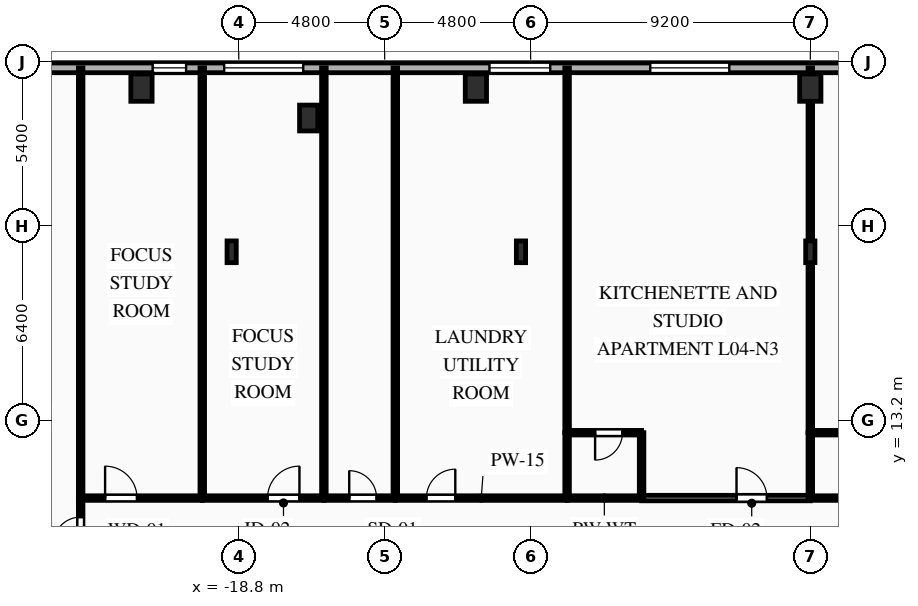
"""IFC4 building model, lengths in metres.
Left out: names, types, materials, properties, quantities, classifications, styles, units other than length and angle.
Written with IfcOpenShell. Run it as: python <this file> out.ifc"""

import sys

from ifc_helpers import new_model, si_unit, direction, frame, frame_2d, origin, origin_2d, place, context, subcontext, project, spatial, rectangle, i_section, extrude, element, fill, save


model = new_model("IFC4")
c1 = context("Model", 3, precision=1e-05, world=origin(), true_north=direction((0.0, 1.0)))
c2 = subcontext(c1, "Body", "Model", "MODEL_VIEW")
j1 = project(units=[si_unit("LENGTHUNIT", "METRE"), si_unit("PLANEANGLEUNIT", "RADIAN")], contexts=[c1])
p1 = place(None, origin())
s1 = spatial("IfcSite", under=j1, at=p1, CompositionType="ELEMENT")
p2 = place(p1, origin())
s2 = spatial("IfcBuilding", under=s1, at=p2, CompositionType="ELEMENT")
p3 = place(p2, frame((0.0, 0.0, 18.0)))
s3 = spatial("IfcBuildingStorey", under=s2, at=p3, CompositionType="ELEMENT", Elevation=18.0)
for number, where, z_axis, x_axis in (
    (1, (-22.0, 24.15, 0.0), (0.0, 0.0, 1.0), (1.0, 0.0, 0.0)),
    (2, (-11.0, 24.15, 0.0), (0.0, 0.0, 1.0), (1.0, 0.0, 0.0)),
    (3, (0.0, 24.15, 0.0), (0.0, 0.0, 1.0), (1.0, 0.0, 0.0)),
):
    element("IfcColumn", number, at=place(p3, frame(where, z_axis=z_axis, x_axis=x_axis)), inside=s3, PredefinedType="COLUMN", context=c2, shape_type="SweptSolid", body=[
        extrude(rectangle(XDim=0.7, YDim=0.9, at=origin_2d()), origin(), (0.0, 0.0, 1.0), 4.5),
    ])
p4 = place(p3, frame((-16.5, 23.15, 0.0), z_axis=(0.0, 0.0, 1.0), x_axis=(1.0, 0.0, 0.0)))
e4 = element("IfcColumn", 4, at=p4, inside=s3, PredefinedType="PILASTER", context=c2, shape_type="SweptSolid", body=[
    extrude(rectangle(XDim=0.6, YDim=0.85, at=origin_2d()), origin(), (0.0, 0.0, 1.0), 4.5),
])
for number, where, z_axis, x_axis in (
    (5, (0.0, 18.75, 0.0), (0.0, 0.0, 1.0), (1.0, 0.0, 0.0)),
    (6, (-9.517, 18.75, 0.0), (0.0, 0.0, 1.0), (1.0, 0.0, 0.0)),
    (7, (-19.033, 18.75, 0.0), (0.0, 0.0, 1.0), (1.0, 0.0, 0.0)),
):
    element("IfcColumn", number, at=place(p3, frame(where, z_axis=z_axis, x_axis=x_axis)), inside=s3, PredefinedType="COLUMN", context=c2, shape_type="SweptSolid", body=[
        extrude(i_section(OverallWidth=0.304, OverallDepth=0.716, WebThickness=0.021, FlangeThickness=0.04, FilletRadius=0.027, at=origin_2d()), origin(), (0.0, 0.0, 1.0), 4.5),
    ])
p5 = place(p3, frame((-36.8, 24.8, 0.0), z_axis=(0.0, 0.0, 1.0), x_axis=(1.0, 0.0, 0.0)))
e8 = element("IfcWall", 8, at=p5, inside=s3, PredefinedType="SOLIDWALL", context=c2, shape_type="SweptSolid", body=[
    extrude(rectangle(XDim=73.6, YDim=0.32, at=frame_2d((36.8, 0.0))), origin(), (0.0, 0.0, 1.0), 4.17),
])
p6 = place(p5, frame((1.079, 0.0, 0.85)))
e9 = element("IfcOpeningElement", 9, at=p6, cuts=e8, PredefinedType="OPENING", context=c2, shape_type="SweptSolid", body=[
    extrude(rectangle(XDim=2.3, YDim=2.4, at=frame_2d((1.15, 1.2))), frame((0.0, 0.17, 0.0), z_axis=(0.0, -1.0, 0.0), x_axis=(1.0, 0.0, 0.0)), (0.0, 0.0, 1.0), 0.34),
])
p7 = place(p5, frame((8.431, 0.0, 0.85)))
e10 = element("IfcOpeningElement", 10, at=p7, cuts=e8, PredefinedType="OPENING", context=c2, shape_type="SweptSolid", body=[
    extrude(rectangle(XDim=2.6, YDim=2.4, at=frame_2d((1.3, 1.2))), frame((0.0, 0.17, 0.0), z_axis=(0.0, -1.0, 0.0), x_axis=(1.0, 0.0, 0.0)), (0.0, 0.0, 1.0), 0.34),
])
p8 = place(p5, frame((15.168, 0.0, 0.85)))
e11 = element("IfcOpeningElement", 11, at=p8, cuts=e8, PredefinedType="OPENING", context=c2, shape_type="SweptSolid", body=[
    extrude(rectangle(XDim=1.1, YDim=1.85, at=frame_2d((0.55, 0.925))), frame((0.0, 0.17, 0.0), z_axis=(0.0, -1.0, 0.0), x_axis=(1.0, 0.0, 0.0)), (0.0, 0.0, 1.0), 0.34),
])
p9 = place(p5, frame((17.521, 0.0, 0.85)))
e12 = element("IfcOpeningElement", 12, at=p9, cuts=e8, PredefinedType="OPENING", context=c2, shape_type="SweptSolid", body=[
    extrude(rectangle(XDim=2.6, YDim=2.4, at=frame_2d((1.3, 1.2))), frame((0.0, 0.17, 0.0), z_axis=(0.0, -1.0, 0.0), x_axis=(1.0, 0.0, 0.0)), (0.0, 0.0, 1.0), 0.34),
])
p10 = place(p5, frame((26.246, 0.0, 0.85)))
e13 = element("IfcOpeningElement", 13, at=p10, cuts=e8, PredefinedType="OPENING", context=c2, shape_type="SweptSolid", body=[
    extrude(rectangle(XDim=2.0, YDim=2.4, at=frame_2d((1.0, 1.2))), frame((0.0, 0.17, 0.0), z_axis=(0.0, -1.0, 0.0), x_axis=(1.0, 0.0, 0.0)), (0.0, 0.0, 1.0), 0.34),
])
p11 = place(p5, frame((31.536, 0.0, 0.85)))
e14 = element("IfcOpeningElement", 14, at=p11, cuts=e8, PredefinedType="OPENING", context=c2, shape_type="SweptSolid", body=[
    extrude(rectangle(XDim=2.6, YDim=2.4, at=frame_2d((1.3, 1.2))), frame((0.0, 0.17, 0.0), z_axis=(0.0, -1.0, 0.0), x_axis=(1.0, 0.0, 0.0)), (0.0, 0.0, 1.0), 0.34),
])
p12 = place(p5, frame((39.544, 0.0, 0.85)))
e15 = element("IfcOpeningElement", 15, at=p12, cuts=e8, PredefinedType="OPENING", context=c2, shape_type="SweptSolid", body=[
    extrude(rectangle(XDim=2.6, YDim=2.4, at=frame_2d((1.3, 1.2))), frame((0.0, 0.17, 0.0), z_axis=(0.0, -1.0, 0.0), x_axis=(1.0, 0.0, 0.0)), (0.0, 0.0, 1.0), 0.34),
])
p13 = place(p5, frame((48.298, 0.0, 0.85)))
e16 = element("IfcOpeningElement", 16, at=p13, cuts=e8, PredefinedType="OPENING", context=c2, shape_type="SweptSolid", body=[
    extrude(rectangle(XDim=2.6, YDim=2.4, at=frame_2d((1.3, 1.2))), frame((0.0, 0.17, 0.0), z_axis=(0.0, -1.0, 0.0), x_axis=(1.0, 0.0, 0.0)), (0.0, 0.0, 1.0), 0.34),
])
p14 = place(p5, frame((53.56, 0.0, 0.85)))
e17 = element("IfcOpeningElement", 17, at=p14, cuts=e8, PredefinedType="OPENING", context=c2, shape_type="SweptSolid", body=[
    extrude(rectangle(XDim=2.6, YDim=2.4, at=frame_2d((1.3, 1.2))), frame((0.0, 0.17, 0.0), z_axis=(0.0, -1.0, 0.0), x_axis=(1.0, 0.0, 0.0)), (0.0, 0.0, 1.0), 0.34),
])
p15 = place(p5, frame((59.216, 0.0, 0.85)))
e18 = element("IfcOpeningElement", 18, at=p15, cuts=e8, PredefinedType="OPENING", context=c2, shape_type="SweptSolid", body=[
    extrude(rectangle(XDim=1.1, YDim=1.85, at=frame_2d((0.55, 0.925))), frame((0.0, 0.17, 0.0), z_axis=(0.0, -1.0, 0.0), x_axis=(1.0, 0.0, 0.0)), (0.0, 0.0, 1.0), 0.34),
])
p16 = place(p5, frame((62.649, 0.0, 0.85)))
e19 = element("IfcOpeningElement", 19, at=p16, cuts=e8, PredefinedType="OPENING", context=c2, shape_type="SweptSolid", body=[
    extrude(rectangle(XDim=2.6, YDim=2.4, at=frame_2d((1.3, 1.2))), frame((0.0, 0.17, 0.0), z_axis=(0.0, -1.0, 0.0), x_axis=(1.0, 0.0, 0.0)), (0.0, 0.0, 1.0), 0.34),
])
p17 = place(p5, frame((70.301, 0.0, 0.85)))
e20 = element("IfcOpeningElement", 20, at=p17, cuts=e8, PredefinedType="OPENING", context=c2, shape_type="SweptSolid", body=[
    extrude(rectangle(XDim=2.3, YDim=2.4, at=frame_2d((1.15, 1.2))), frame((0.0, 0.17, 0.0), z_axis=(0.0, -1.0, 0.0), x_axis=(1.0, 0.0, 0.0)), (0.0, 0.0, 1.0), 0.34),
])
p18 = place(p3, frame((-24.0, 8.5, 0.0), z_axis=(0.0, 0.0, 1.0), x_axis=(0.0, 1.0, 0.0)))
e21 = element("IfcWall", 21, at=p18, inside=s3, PredefinedType="PARTITIONING", context=c2, shape_type="SweptSolid", body=[
    extrude(rectangle(XDim=2.15, YDim=0.15, at=frame_2d((1.075, 0.0))), origin(), (0.0, 0.0, 1.0), 4.17),
])
p19 = place(p18, frame((0.625, 0.0, 0.0)))
e22 = element("IfcOpeningElement", 22, at=p19, cuts=e21, PredefinedType="OPENING", context=c2, shape_type="SweptSolid", body=[
    extrude(rectangle(XDim=0.9, YDim=2.1, at=frame_2d((0.45, 1.05))), frame((0.0, 0.085, 0.0), z_axis=(0.0, -1.0, 0.0), x_axis=(1.0, 0.0, 0.0)), (0.0, 0.0, 1.0), 0.17),
])
p20 = place(p3, frame((-24.0, 10.65, 0.0), z_axis=(0.0, 0.0, 1.0), x_axis=(1.0, 0.0, 0.0)))
e23 = element("IfcWall", 23, at=p20, inside=s3, PredefinedType="PARTITIONING", context=c2, shape_type="SweptSolid", body=[
    extrude(rectangle(XDim=4.0, YDim=0.15, at=frame_2d((2.0, 0.0))), origin(), (0.0, 0.0, 1.0), 4.17),
])
p21 = place(p20, frame((0.804, 0.0, 0.0)))
e24 = element("IfcOpeningElement", 24, at=p21, cuts=e23, PredefinedType="OPENING", context=c2, shape_type="SweptSolid", body=[
    extrude(rectangle(XDim=1.05, YDim=2.15, at=frame_2d((0.525, 1.075))), frame((0.0, 0.085, 0.0), z_axis=(0.0, -1.0, 0.0), x_axis=(1.0, 0.0, 0.0)), (0.0, 0.0, 1.0), 0.17),
])
p22 = place(p3, frame((-20.0, 10.65, 0.0), z_axis=(0.0, 0.0, 1.0), x_axis=(1.0, 0.0, 0.0)))
e25 = element("IfcWall", 25, at=p22, inside=s3, PredefinedType="PARTITIONING", context=c2, shape_type="SweptSolid", body=[
    extrude(rectangle(XDim=4.0, YDim=0.15, at=frame_2d((2.0, 0.0))), origin(), (0.0, 0.0, 1.0), 4.17),
])
p23 = place(p22, frame((2.146, 0.0, 0.0)))
e26 = element("IfcOpeningElement", 26, at=p23, cuts=e25, PredefinedType="OPENING", context=c2, shape_type="SweptSolid", body=[
    extrude(rectangle(XDim=1.05, YDim=2.15, at=frame_2d((0.525, 1.075))), frame((0.0, 0.085, 0.0), z_axis=(0.0, -1.0, 0.0), x_axis=(1.0, 0.0, 0.0)), (0.0, 0.0, 1.0), 0.17),
])
p24 = place(p3, frame((-16.0, 10.65, 0.0), z_axis=(0.0, 0.0, 1.0), x_axis=(1.0, 0.0, 0.0)))
e27 = element("IfcWall", 27, at=p24, inside=s3, PredefinedType="PLUMBINGWALL", context=c2, shape_type="SweptSolid", body=[
    extrude(rectangle(XDim=2.35, YDim=0.15, at=frame_2d((1.175, 0.0))), origin(), (0.0, 0.0, 1.0), 4.17),
])
p25 = place(p24, frame((0.834, 0.0, 0.0)))
e28 = element("IfcOpeningElement", 28, at=p25, cuts=e27, PredefinedType="OPENING", context=c2, shape_type="SweptSolid", body=[
    extrude(rectangle(XDim=0.9, YDim=2.1, at=frame_2d((0.45, 1.05))), frame((0.0, 0.085, 0.0), z_axis=(0.0, -1.0, 0.0), x_axis=(1.0, 0.0, 0.0)), (0.0, 0.0, 1.0), 0.17),
])
p26 = place(p3, frame((-13.65, 10.65, 0.0), z_axis=(0.0, 0.0, 1.0), x_axis=(1.0, 0.0, 0.0)))
e29 = element("IfcWall", 29, at=p26, inside=s3, PredefinedType="PARTITIONING", context=c2, shape_type="SweptSolid", body=[
    extrude(rectangle(XDim=5.65, YDim=0.15, at=frame_2d((2.825, 0.0))), origin(), (0.0, 0.0, 1.0), 4.17),
])
p27 = place(p26, frame((1.022, 0.0, 0.0)))
e30 = element("IfcOpeningElement", 30, at=p27, cuts=e29, PredefinedType="OPENING", context=c2, shape_type="SweptSolid", body=[
    extrude(rectangle(XDim=0.95, YDim=2.1, at=frame_2d((0.475, 1.05))), frame((0.0, 0.085, 0.0), z_axis=(0.0, -1.0, 0.0), x_axis=(1.0, 0.0, 0.0)), (0.0, 0.0, 1.0), 0.17),
])
p28 = place(p3, frame((-5.55, 10.65, 0.0), z_axis=(0.0, 0.0, 1.0), x_axis=(1.0, 0.0, 0.0)))
e31 = element("IfcWall", 31, at=p28, inside=s3, PredefinedType="PARTITIONING", context=c2, shape_type="SweptSolid", body=[
    extrude(rectangle(XDim=5.55, YDim=0.18, at=frame_2d((2.775, 0.0))), origin(), (0.0, 0.0, 1.0), 4.17),
])
p29 = place(p28, frame((3.123, 0.0, 0.0)))
e32 = element("IfcOpeningElement", 32, at=p29, cuts=e31, PredefinedType="OPENING", context=c2, shape_type="SweptSolid", body=[
    extrude(rectangle(XDim=1.0, YDim=2.15, at=frame_2d((0.5, 1.075))), frame((0.0, 0.1, 0.0), z_axis=(0.0, -1.0, 0.0), x_axis=(1.0, 0.0, 0.0)), (0.0, 0.0, 1.0), 0.2),
])
for number, where, z_axis, x_axis in (
    (33, (-8.0, 10.65, 0.0), (0.0, 0.0, 1.0), (1.0, 0.0, 0.0)),
    (34, (0.0, 10.65, 0.0), (0.0, 0.0, 1.0), (1.0, 0.0, 0.0)),
):
    element("IfcWall", number, at=place(p3, frame(where, z_axis=z_axis, x_axis=x_axis)), inside=s3, PredefinedType="PLUMBINGWALL", context=c2, shape_type="SweptSolid", body=[
        extrude(rectangle(XDim=2.45, YDim=0.15, at=frame_2d((1.225, 0.0))), origin(), (0.0, 0.0, 1.0), 4.17),
    ])
for number, where, z_axis, x_axis in (
    (35, (-24.0, 24.8, 0.0), (0.0, 0.0, 1.0), (0.0, -1.0, 0.0)),
    (36, (-20.0, 24.8, 0.0), (0.0, 0.0, 1.0), (0.0, -1.0, 0.0)),
):
    element("IfcWall", number, at=place(p3, frame(where, z_axis=z_axis, x_axis=x_axis)), inside=s3, PredefinedType="PARTITIONING", context=c2, shape_type="SweptSolid", body=[
        extrude(rectangle(XDim=14.15, YDim=0.15, at=frame_2d((7.075, 0.0))), origin(), (0.0, 0.0, 1.0), 4.17),
    ])
for number, where, z_axis, x_axis in (
    (37, (-16.0, 24.8, 0.0), (0.0, 0.0, 1.0), (0.0, -1.0, 0.0)),
    (38, (-13.65, 24.8, 0.0), (0.0, 0.0, 1.0), (0.0, -1.0, 0.0)),
):
    element("IfcWall", number, at=place(p3, frame(where, z_axis=z_axis, x_axis=x_axis)), inside=s3, PredefinedType="PLUMBINGWALL", context=c2, shape_type="SweptSolid", body=[
        extrude(rectangle(XDim=14.15, YDim=0.15, at=frame_2d((7.075, 0.0))), origin(), (0.0, 0.0, 1.0), 4.17),
    ])
p30 = place(p3, frame((-8.0, 24.8, 0.0), z_axis=(0.0, 0.0, 1.0), x_axis=(0.0, -1.0, 0.0)))
e39 = element("IfcWall", 39, at=p30, inside=s3, PredefinedType="PARTITIONING", context=c2, shape_type="SweptSolid", body=[
    extrude(rectangle(XDim=12.0, YDim=0.15, at=frame_2d((6.0, 0.0))), origin(), (0.0, 0.0, 1.0), 4.17),
])
p31 = place(p3, frame((-8.0, 12.8, 0.0), z_axis=(0.0, 0.0, 1.0), x_axis=(0.0, -1.0, 0.0)))
e40 = element("IfcWall", 40, at=p31, inside=s3, PredefinedType="PLUMBINGWALL", context=c2, shape_type="SweptSolid", body=[
    extrude(rectangle(XDim=2.15, YDim=0.15, at=frame_2d((1.075, 0.0))), origin(), (0.0, 0.0, 1.0), 4.17),
])
p32 = place(p3, frame((-5.55, 12.8, 0.0), z_axis=(0.0, 0.0, 1.0), x_axis=(-1.0, 0.0, 0.0)))
e41 = element("IfcWall", 41, at=p32, inside=s3, PredefinedType="PLUMBINGWALL", context=c2, shape_type="SweptSolid", body=[
    extrude(rectangle(XDim=2.45, YDim=0.15, at=frame_2d((1.225, 0.0))), origin(), (0.0, 0.0, 1.0), 4.17),
])
p33 = place(p32, frame((0.629, 0.0, 0.0)))
e42 = element("IfcOpeningElement", 42, at=p33, cuts=e41, PredefinedType="OPENING", context=c2, shape_type="SweptSolid", body=[
    extrude(rectangle(XDim=0.9, YDim=2.1, at=frame_2d((0.45, 1.05))), frame((0.0, 0.085, 0.0), z_axis=(0.0, -1.0, 0.0), x_axis=(1.0, 0.0, 0.0)), (0.0, 0.0, 1.0), 0.17),
])
p34 = place(p3, frame((-5.55, 10.65, 0.0), z_axis=(0.0, 0.0, 1.0), x_axis=(0.0, 1.0, 0.0)))
e43 = element("IfcWall", 43, at=p34, inside=s3, PredefinedType="PLUMBINGWALL", context=c2, shape_type="SweptSolid", body=[
    extrude(rectangle(XDim=2.15, YDim=0.15, at=frame_2d((1.075, 0.0))), origin(), (0.0, 0.0, 1.0), 4.17),
])
p35 = place(p3, frame((0.0, 24.8, 0.0), z_axis=(0.0, 0.0, 1.0), x_axis=(0.0, -1.0, 0.0)))
e44 = element("IfcWall", 44, at=p35, inside=s3, PredefinedType="PARTITIONING", context=c2, shape_type="SweptSolid", body=[
    extrude(rectangle(XDim=12.0, YDim=0.15, at=frame_2d((6.0, 0.0))), origin(), (0.0, 0.0, 1.0), 3.555),
])
p36 = place(p3, frame((0.0, 12.8, 0.0), z_axis=(0.0, 0.0, 1.0), x_axis=(0.0, -1.0, 0.0)))
e45 = element("IfcWall", 45, at=p36, inside=s3, PredefinedType="PLUMBINGWALL", context=c2, shape_type="SweptSolid", body=[
    extrude(rectangle(XDim=2.15, YDim=0.15, at=frame_2d((1.075, 0.0))), origin(), (0.0, 0.0, 1.0), 4.17),
])
p37 = place(p3, frame((2.45, 12.8, 0.0), z_axis=(0.0, 0.0, 1.0), x_axis=(-1.0, 0.0, 0.0)))
e46 = element("IfcWall", 46, at=p37, inside=s3, PredefinedType="PLUMBINGWALL", context=c2, shape_type="SweptSolid", body=[
    extrude(rectangle(XDim=2.45, YDim=0.15, at=frame_2d((1.225, 0.0))), origin(), (0.0, 0.0, 1.0), 4.17),
])
p38 = place(p37, frame((0.629, 0.0, 0.0)))
e47 = element("IfcOpeningElement", 47, at=p38, cuts=e46, PredefinedType="OPENING", context=c2, shape_type="SweptSolid", body=[
    extrude(rectangle(XDim=0.9, YDim=2.1, at=frame_2d((0.45, 1.05))), frame((0.0, 0.085, 0.0), z_axis=(0.0, -1.0, 0.0), x_axis=(1.0, 0.0, 0.0)), (0.0, 0.0, 1.0), 0.17),
])
p39 = place(p8, origin())
e48 = element("IfcWindow", 48, at=p39, inside=s3, PartitioningType="SINGLE_PANEL", PredefinedType="WINDOW", context=c2, shape_type="SweptSolid", body=[
    extrude(rectangle(XDim=1.1, YDim=1.85, at=frame_2d((0.55, 0.925))), frame((0.0, 0.03, 0.0), z_axis=(0.0, -1.0, 0.0), x_axis=(1.0, 0.0, 0.0)), (0.0, 0.0, 1.0), 0.06),
])
fill(e11, e48)
p40 = place(p9, origin())
e49 = element("IfcWindow", 49, at=p40, inside=s3, PartitioningType="SINGLE_PANEL", PredefinedType="WINDOW", context=c2, shape_type="SweptSolid", body=[
    extrude(rectangle(XDim=2.6, YDim=2.4, at=frame_2d((1.3, 1.2))), frame((0.0, 0.03, 0.0), z_axis=(0.0, -1.0, 0.0), x_axis=(1.0, 0.0, 0.0)), (0.0, 0.0, 1.0), 0.06),
])
fill(e12, e49)
p41 = place(p10, origin())
e50 = element("IfcWindow", 50, at=p41, inside=s3, PartitioningType="SINGLE_PANEL", PredefinedType="WINDOW", context=c2, shape_type="SweptSolid", body=[
    extrude(rectangle(XDim=2.0, YDim=2.4, at=frame_2d((1.0, 1.2))), frame((0.0, 0.03, 0.0), z_axis=(0.0, -1.0, 0.0), x_axis=(1.0, 0.0, 0.0)), (0.0, 0.0, 1.0), 0.06),
])
fill(e13, e50)
p42 = place(p11, origin())
e51 = element("IfcWindow", 51, at=p42, inside=s3, PartitioningType="SINGLE_PANEL", PredefinedType="WINDOW", context=c2, shape_type="SweptSolid", body=[
    extrude(rectangle(XDim=2.6, YDim=2.4, at=frame_2d((1.3, 1.2))), frame((0.0, 0.03, 0.0), z_axis=(0.0, -1.0, 0.0), x_axis=(1.0, 0.0, 0.0)), (0.0, 0.0, 1.0), 0.06),
])
fill(e14, e51)
p43 = place(p19, origin())
e52 = element("IfcDoor", 52, at=p43, inside=s3, OperationType="SINGLE_SWING_LEFT", PredefinedType="DOOR", context=c2, shape_type="SweptSolid", body=[
    extrude(rectangle(XDim=0.9, YDim=2.1, at=frame_2d((0.45, 1.05))), frame((0.0, 0.025, 0.0), z_axis=(0.0, -1.0, 0.0), x_axis=(1.0, 0.0, 0.0)), (0.0, 0.0, 1.0), 0.05),
])
fill(e22, e52)
p44 = place(p21, origin())
e53 = element("IfcDoor", 53, at=p44, inside=s3, OperationType="SINGLE_SWING_LEFT", PredefinedType="DOOR", context=c2, shape_type="SweptSolid", body=[
    extrude(rectangle(XDim=1.05, YDim=2.15, at=frame_2d((0.525, 1.075))), frame((0.0, 0.025, 0.0), z_axis=(0.0, -1.0, 0.0), x_axis=(1.0, 0.0, 0.0)), (0.0, 0.0, 1.0), 0.05),
])
fill(e24, e53)
p45 = place(p23, origin())
e54 = element("IfcDoor", 54, at=p45, inside=s3, OperationType="SINGLE_SWING_RIGHT", PredefinedType="DOOR", context=c2, shape_type="SweptSolid", body=[
    extrude(rectangle(XDim=1.05, YDim=2.15, at=frame_2d((0.525, 1.075))), frame((0.0, 0.025, 0.0), z_axis=(0.0, -1.0, 0.0), x_axis=(1.0, 0.0, 0.0)), (0.0, 0.0, 1.0), 0.05),
])
fill(e26, e54)
p46 = place(p25, origin())
e55 = element("IfcDoor", 55, at=p46, inside=s3, OperationType="SINGLE_SWING_LEFT", PredefinedType="DOOR", context=c2, shape_type="SweptSolid", body=[
    extrude(rectangle(XDim=0.9, YDim=2.1, at=frame_2d((0.45, 1.05))), frame((0.0, 0.025, 0.0), z_axis=(0.0, -1.0, 0.0), x_axis=(1.0, 0.0, 0.0)), (0.0, 0.0, 1.0), 0.05),
])
fill(e28, e55)
p47 = place(p27, origin())
e56 = element("IfcDoor", 56, at=p47, inside=s3, OperationType="SINGLE_SWING_RIGHT", PredefinedType="DOOR", context=c2, shape_type="SweptSolid", body=[
    extrude(rectangle(XDim=0.95, YDim=2.1, at=frame_2d((0.475, 1.05))), frame((0.0, 0.025, 0.0), z_axis=(0.0, -1.0, 0.0), x_axis=(1.0, 0.0, 0.0)), (0.0, 0.0, 1.0), 0.05),
])
fill(e30, e56)
p48 = place(p29, origin())
e57 = element("IfcDoor", 57, at=p48, inside=s3, OperationType="SINGLE_SWING_LEFT", PredefinedType="DOOR", context=c2, shape_type="SweptSolid", body=[
    extrude(rectangle(XDim=1.0, YDim=2.15, at=frame_2d((0.5, 1.075))), frame((0.0, 0.025, 0.0), z_axis=(0.0, -1.0, 0.0), x_axis=(1.0, 0.0, 0.0)), (0.0, 0.0, 1.0), 0.05),
])
fill(e32, e57)
p49 = place(p33, origin())
e58 = element("IfcDoor", 58, at=p49, inside=s3, OperationType="SINGLE_SWING_RIGHT", PredefinedType="DOOR", context=c2, shape_type="SweptSolid", body=[
    extrude(rectangle(XDim=0.9, YDim=2.1, at=frame_2d((0.45, 1.05))), frame((0.0, 0.025, 0.0), z_axis=(0.0, -1.0, 0.0), x_axis=(1.0, 0.0, 0.0)), (0.0, 0.0, 1.0), 0.05),
])
fill(e42, e58)
p50 = place(p38, origin())
e59 = element("IfcDoor", 59, at=p50, inside=s3, OperationType="SINGLE_SWING_LEFT", PredefinedType="DOOR", context=c2, shape_type="SweptSolid", body=[
    extrude(rectangle(XDim=0.9, YDim=2.1, at=frame_2d((0.45, 1.05))), frame((0.0, 0.025, 0.0), z_axis=(0.0, -1.0, 0.0), x_axis=(1.0, 0.0, 0.0)), (0.0, 0.0, 1.0), 0.05),
])
fill(e47, e59)
save(model, sys.argv[1])
